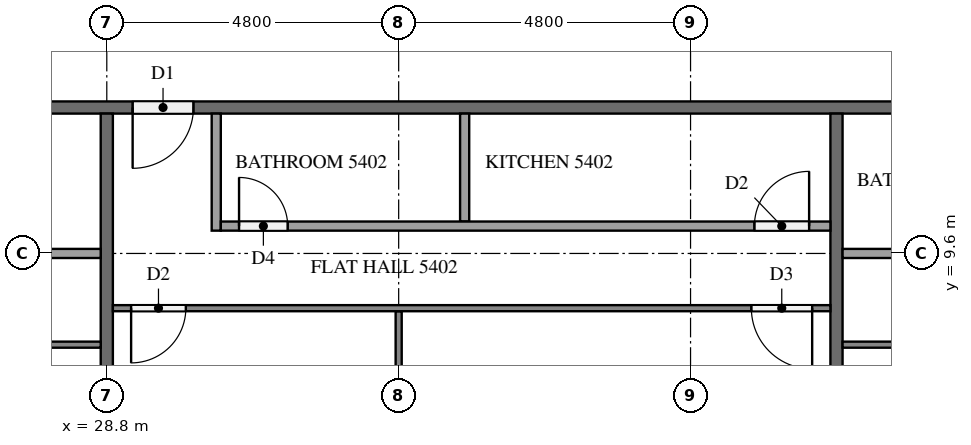
"""IFC4 building model, lengths in metres.
Left out: names, types, materials, properties, quantities, classifications, styles, units other than length and angle.
Written with IfcOpenShell. Run it as: python <this file> out.ifc"""

import sys

from ifc_helpers import new_model, si_unit, direction, frame, frame_2d, origin, place, context, subcontext, project, spatial, rectangle, extrude, element, fill, save


model = new_model("IFC4")
c1 = context("Model", 3, precision=1e-05, world=origin(), true_north=direction((0.0, 1.0)))
c2 = subcontext(c1, "Body", "Model", "MODEL_VIEW")
j1 = project(units=[si_unit("LENGTHUNIT", "METRE"), si_unit("PLANEANGLEUNIT", "RADIAN")], contexts=[c1])
p1 = place(None, origin())
s1 = spatial("IfcSite", under=j1, at=p1, CompositionType="ELEMENT")
p2 = place(p1, origin())
s2 = spatial("IfcBuilding", under=s1, at=p2, CompositionType="ELEMENT")
p3 = place(p2, frame((0.0, 0.0, 208.8)))
s3 = spatial("IfcBuildingStorey", under=s2, at=p3, CompositionType="ELEMENT", Elevation=208.8)
p4 = place(p3, frame((50.5, 12.0, 0.0), z_axis=(0.0, 0.0, 1.0), x_axis=(-1.0, 0.0, 0.0)))
e1 = element("IfcWall", 1, at=p4, inside=s3, PredefinedType="PARTITIONING", context=c2, shape_type="SweptSolid", body=[
    extrude(rectangle(XDim=38.6, YDim=0.2, at=frame_2d((19.3, 0.0))), origin(), (0.0, 0.0, 1.0), 3.2),
])
p5 = place(p4, frame((37.075, 0.0, 0.0)))
e2 = element("IfcOpeningElement", 2, at=p5, cuts=e1, PredefinedType="OPENING", context=c2, shape_type="SweptSolid", body=[
    extrude(rectangle(XDim=1.0, YDim=2.1, at=frame_2d((0.5, 1.05))), frame((0.0, 0.11, 0.0), z_axis=(0.0, -1.0, 0.0), x_axis=(1.0, 0.0, 0.0)), (0.0, 0.0, 1.0), 0.22),
])
p6 = place(p4, frame((20.275, 0.0, 0.0)))
e3 = element("IfcOpeningElement", 3, at=p6, cuts=e1, PredefinedType="OPENING", context=c2, shape_type="SweptSolid", body=[
    extrude(rectangle(XDim=1.0, YDim=2.1, at=frame_2d((0.5, 1.05))), frame((0.0, 0.11, 0.0), z_axis=(0.0, -1.0, 0.0), x_axis=(1.0, 0.0, 0.0)), (0.0, 0.0, 1.0), 0.22),
])
p7 = place(p4, frame((0.525, 0.0, 0.0)))
e4 = element("IfcOpeningElement", 4, at=p7, cuts=e1, PredefinedType="OPENING", context=c2, shape_type="SweptSolid", body=[
    extrude(rectangle(XDim=1.0, YDim=2.1, at=frame_2d((0.5, 1.05))), frame((0.0, 0.11, 0.0), z_axis=(0.0, -1.0, 0.0), x_axis=(1.0, 0.0, 0.0)), (0.0, 0.0, 1.0), 0.22),
])
p8 = place(p3, frame((28.8, 11.9, 0.0), z_axis=(0.0, 0.0, 1.0), x_axis=(0.0, -1.0, 0.0)))
e5 = element("IfcWall", 5, at=p8, inside=s3, PredefinedType="PARTITIONING", context=c2, shape_type="SweptSolid", body=[
    extrude(rectangle(XDim=6.775, YDim=0.2, at=frame_2d((3.387, 0.0))), origin(), (0.0, 0.0, 1.0), 3.2),
])
p9 = place(p3, frame((40.8, 11.9, 0.0), z_axis=(0.0, 0.0, 1.0), x_axis=(0.0, -1.0, 0.0)))
e6 = element("IfcWall", 6, at=p9, inside=s3, PredefinedType="PARTITIONING", context=c2, shape_type="SweptSolid", body=[
    extrude(rectangle(XDim=7.0, YDim=0.2, at=frame_2d((3.5, 0.0))), origin(), (0.0, 0.0, 1.0), 3.2),
])
p10 = place(p3, frame((28.7, 8.1, 0.0), z_axis=(0.0, 0.0, 1.0), x_axis=(-1.0, 0.0, 0.0)))
e7 = element("IfcWall", 7, at=p10, inside=s3, PredefinedType="PARTITIONING", context=c2, shape_type="SweptSolid", body=[
    extrude(rectangle(XDim=16.6, YDim=0.1, at=frame_2d((8.3, 0.0))), origin(), (0.0, 0.0, 1.0), 3.2),
])
p11 = place(p10, frame((15.4, 0.0, 0.0)))
e8 = element("IfcOpeningElement", 8, at=p11, cuts=e7, PredefinedType="OPENING", context=c2, shape_type="SweptSolid", body=[
    extrude(rectangle(XDim=0.9, YDim=2.1, at=frame_2d((0.45, 1.05))), frame((0.0, 0.06, 0.0), z_axis=(0.0, -1.0, 0.0), x_axis=(1.0, 0.0, 0.0)), (0.0, 0.0, 1.0), 0.12),
])
p12 = place(p10, frame((5.05, 0.0, 0.0)))
e9 = element("IfcOpeningElement", 9, at=p12, cuts=e7, PredefinedType="OPENING", context=c2, shape_type="SweptSolid", body=[
    extrude(rectangle(XDim=1.0, YDim=2.1, at=frame_2d((0.5, 1.05))), frame((0.0, 0.06, 0.0), z_axis=(0.0, -1.0, 0.0), x_axis=(1.0, 0.0, 0.0)), (0.0, 0.0, 1.0), 0.12),
])
p13 = place(p10, frame((3.45, 0.0, 0.0)))
e10 = element("IfcOpeningElement", 10, at=p13, cuts=e7, PredefinedType="OPENING", context=c2, shape_type="SweptSolid", body=[
    extrude(rectangle(XDim=0.9, YDim=2.1, at=frame_2d((0.45, 1.05))), frame((0.0, 0.06, 0.0), z_axis=(0.0, -1.0, 0.0), x_axis=(1.0, 0.0, 0.0)), (0.0, 0.0, 1.0), 0.12),
])
p14 = place(p3, frame((13.875, 9.6, 0.0), z_axis=(0.0, 0.0, 1.0), x_axis=(1.0, 0.0, 0.0)))
e11 = element("IfcWall", 11, at=p14, inside=s3, PredefinedType="PARTITIONING", context=c2, shape_type="SweptSolid", body=[
    extrude(rectangle(XDim=14.825, YDim=0.15, at=frame_2d((7.413, 0.0))), origin(), (0.0, 0.0, 1.0), 3.2),
])
p15 = place(p14, frame((0.3, 0.0, 0.0)))
e12 = element("IfcOpeningElement", 12, at=p15, cuts=e11, PredefinedType="OPENING", context=c2, shape_type="SweptSolid", body=[
    extrude(rectangle(XDim=0.9, YDim=2.1, at=frame_2d((0.45, 1.05))), frame((0.0, 0.085, 0.0), z_axis=(0.0, -1.0, 0.0), x_axis=(1.0, 0.0, 0.0)), (0.0, 0.0, 1.0), 0.17),
])
p16 = place(p14, frame((9.138, 0.0, 0.0)))
e13 = element("IfcOpeningElement", 13, at=p16, cuts=e11, PredefinedType="OPENING", context=c2, shape_type="SweptSolid", body=[
    extrude(rectangle(XDim=0.8, YDim=2.1, at=frame_2d((0.4, 1.05))), frame((0.0, 0.085, 0.0), z_axis=(0.0, -1.0, 0.0), x_axis=(1.0, 0.0, 0.0)), (0.0, 0.0, 1.0), 0.17),
])
p17 = place(p14, frame((10.588, 0.0, 0.0)))
e14 = element("IfcOpeningElement", 14, at=p17, cuts=e11, PredefinedType="OPENING", context=c2, shape_type="SweptSolid", body=[
    extrude(rectangle(XDim=0.9, YDim=2.1, at=frame_2d((0.45, 1.05))), frame((0.0, 0.085, 0.0), z_axis=(0.0, -1.0, 0.0), x_axis=(1.0, 0.0, 0.0)), (0.0, 0.0, 1.0), 0.17),
])
p18 = place(p3, frame((33.6, 8.65, 0.0), z_axis=(0.0, 0.0, 1.0), x_axis=(0.0, -1.0, 0.0)))
e15 = element("IfcWall", 15, at=p18, inside=s3, PredefinedType="PARTITIONING", context=c2, shape_type="SweptSolid", body=[
    extrude(rectangle(XDim=3.75, YDim=0.1, at=frame_2d((1.875, 0.0))), origin(), (0.0, 0.0, 1.0), 3.2),
])
p19 = place(p3, frame((40.7, 8.7, 0.0), z_axis=(0.0, 0.0, 1.0), x_axis=(-1.0, 0.0, 0.0)))
e16 = element("IfcWall", 16, at=p19, inside=s3, PredefinedType="PARTITIONING", context=c2, shape_type="SweptSolid", body=[
    extrude(rectangle(XDim=11.8, YDim=0.1, at=frame_2d((5.9, 0.0))), origin(), (0.0, 0.0, 1.0), 3.2),
])
p20 = place(p19, frame((10.6, 0.0, 0.0)))
e17 = element("IfcOpeningElement", 17, at=p20, cuts=e16, PredefinedType="OPENING", context=c2, shape_type="SweptSolid", body=[
    extrude(rectangle(XDim=0.9, YDim=2.1, at=frame_2d((0.45, 1.05))), frame((0.0, 0.06, 0.0), z_axis=(0.0, -1.0, 0.0), x_axis=(1.0, 0.0, 0.0)), (0.0, 0.0, 1.0), 0.12),
])
p21 = place(p19, frame((0.3, 0.0, 0.0)))
e18 = element("IfcOpeningElement", 18, at=p21, cuts=e16, PredefinedType="OPENING", context=c2, shape_type="SweptSolid", body=[
    extrude(rectangle(XDim=1.0, YDim=2.1, at=frame_2d((0.5, 1.05))), frame((0.0, 0.06, 0.0), z_axis=(0.0, -1.0, 0.0), x_axis=(1.0, 0.0, 0.0)), (0.0, 0.0, 1.0), 0.12),
])
p22 = place(p3, frame((34.685, 11.9, 0.0), z_axis=(0.0, 0.0, 1.0), x_axis=(0.0, -1.0, 0.0)))
e19 = element("IfcWall", 19, at=p22, inside=s3, PredefinedType="PARTITIONING", context=c2, shape_type="SweptSolid", body=[
    extrude(rectangle(XDim=1.775, YDim=0.15, at=frame_2d((0.887, 0.0))), origin(), (0.0, 0.0, 1.0), 3.2),
])
p23 = place(p3, frame((30.6, 11.9, 0.0), z_axis=(0.0, 0.0, 1.0), x_axis=(0.0, -1.0, 0.0)))
e20 = element("IfcWall", 20, at=p23, inside=s3, PredefinedType="PARTITIONING", context=c2, shape_type="SweptSolid", body=[
    extrude(rectangle(XDim=1.925, YDim=0.15, at=frame_2d((0.962, 0.0))), origin(), (0.0, 0.0, 1.0), 3.2),
])
p24 = place(p3, frame((30.675, 10.05, 0.0), z_axis=(0.0, 0.0, 1.0), x_axis=(1.0, 0.0, 0.0)))
e21 = element("IfcWall", 21, at=p24, inside=s3, PredefinedType="PARTITIONING", context=c2, shape_type="SweptSolid", body=[
    extrude(rectangle(XDim=10.025, YDim=0.15, at=frame_2d((5.012, 0.0))), origin(), (0.0, 0.0, 1.0), 3.2),
])
p25 = place(p24, frame((0.3, 0.0, 0.0)))
e22 = element("IfcOpeningElement", 22, at=p25, cuts=e21, PredefinedType="OPENING", context=c2, shape_type="SweptSolid", body=[
    extrude(rectangle(XDim=0.8, YDim=2.1, at=frame_2d((0.4, 1.05))), frame((0.0, 0.085, 0.0), z_axis=(0.0, -1.0, 0.0), x_axis=(1.0, 0.0, 0.0)), (0.0, 0.0, 1.0), 0.17),
])
p26 = place(p24, frame((8.775, 0.0, 0.0)))
e23 = element("IfcOpeningElement", 23, at=p26, cuts=e21, PredefinedType="OPENING", context=c2, shape_type="SweptSolid", body=[
    extrude(rectangle(XDim=0.9, YDim=2.1, at=frame_2d((0.45, 1.05))), frame((0.0, 0.085, 0.0), z_axis=(0.0, -1.0, 0.0), x_axis=(1.0, 0.0, 0.0)), (0.0, 0.0, 1.0), 0.17),
])
p27 = place(p3, frame((50.3, 8.1, 0.0), z_axis=(0.0, 0.0, 1.0), x_axis=(-1.0, 0.0, 0.0)))
e24 = element("IfcWall", 24, at=p27, inside=s3, PredefinedType="PARTITIONING", context=c2, shape_type="SweptSolid", body=[
    extrude(rectangle(XDim=9.4, YDim=0.1, at=frame_2d((4.7, 0.0))), origin(), (0.0, 0.0, 1.0), 3.2),
])
p28 = place(p27, frame((3.35, 0.0, 0.0)))
e25 = element("IfcOpeningElement", 25, at=p28, cuts=e24, PredefinedType="OPENING", context=c2, shape_type="SweptSolid", body=[
    extrude(rectangle(XDim=1.0, YDim=2.1, at=frame_2d((0.5, 1.05))), frame((0.0, 0.06, 0.0), z_axis=(0.0, -1.0, 0.0), x_axis=(1.0, 0.0, 0.0)), (0.0, 0.0, 1.0), 0.12),
])
p29 = place(p27, frame((5.05, 0.0, 0.0)))
e26 = element("IfcOpeningElement", 26, at=p29, cuts=e24, PredefinedType="OPENING", context=c2, shape_type="SweptSolid", body=[
    extrude(rectangle(XDim=0.9, YDim=2.1, at=frame_2d((0.45, 1.05))), frame((0.0, 0.06, 0.0), z_axis=(0.0, -1.0, 0.0), x_axis=(1.0, 0.0, 0.0)), (0.0, 0.0, 1.0), 0.12),
])
p30 = place(p3, frame((40.9, 9.6, 0.0), z_axis=(0.0, 0.0, 1.0), x_axis=(1.0, 0.0, 0.0)))
e27 = element("IfcWall", 27, at=p30, inside=s3, PredefinedType="PARTITIONING", context=c2, shape_type="SweptSolid", body=[
    extrude(rectangle(XDim=7.625, YDim=0.15, at=frame_2d((3.812, 0.0))), origin(), (0.0, 0.0, 1.0), 3.2),
])
p31 = place(p30, frame((3.375, 0.0, 0.0)))
e28 = element("IfcOpeningElement", 28, at=p31, cuts=e27, PredefinedType="OPENING", context=c2, shape_type="SweptSolid", body=[
    extrude(rectangle(XDim=0.9, YDim=2.1, at=frame_2d((0.45, 1.05))), frame((0.0, 0.085, 0.0), z_axis=(0.0, -1.0, 0.0), x_axis=(1.0, 0.0, 0.0)), (0.0, 0.0, 1.0), 0.17),
])
p32 = place(p30, frame((1.925, 0.0, 0.0)))
e29 = element("IfcOpeningElement", 29, at=p32, cuts=e27, PredefinedType="OPENING", context=c2, shape_type="SweptSolid", body=[
    extrude(rectangle(XDim=0.8, YDim=2.1, at=frame_2d((0.4, 1.05))), frame((0.0, 0.085, 0.0), z_axis=(0.0, -1.0, 0.0), x_axis=(1.0, 0.0, 0.0)), (0.0, 0.0, 1.0), 0.17),
])
p33 = place(p6, origin())
e30 = element("IfcDoor", 30, at=p33, inside=s3, OperationType="SINGLE_SWING_RIGHT", PredefinedType="DOOR", context=c2, shape_type="SweptSolid", body=[
    extrude(rectangle(XDim=1.0, YDim=2.1, at=frame_2d((0.5, 1.05))), frame((0.0, 0.025, 0.0), z_axis=(0.0, -1.0, 0.0), x_axis=(1.0, 0.0, 0.0)), (0.0, 0.0, 1.0), 0.05),
])
fill(e3, e30)
p34 = place(p20, origin())
e31 = element("IfcDoor", 31, at=p34, inside=s3, OperationType="SINGLE_SWING_RIGHT", PredefinedType="DOOR", context=c2, shape_type="SweptSolid", body=[
    extrude(rectangle(XDim=0.9, YDim=2.1, at=frame_2d((0.45, 1.05))), frame((0.0, 0.025, 0.0), z_axis=(0.0, -1.0, 0.0), x_axis=(1.0, 0.0, 0.0)), (0.0, 0.0, 1.0), 0.05),
])
fill(e17, e31)
p35 = place(p21, origin())
e32 = element("IfcDoor", 32, at=p35, inside=s3, OperationType="SINGLE_SWING_LEFT", PredefinedType="DOOR", context=c2, shape_type="SweptSolid", body=[
    extrude(rectangle(XDim=1.0, YDim=2.1, at=frame_2d((0.5, 1.05))), frame((0.0, 0.025, 0.0), z_axis=(0.0, -1.0, 0.0), x_axis=(1.0, 0.0, 0.0)), (0.0, 0.0, 1.0), 0.05),
])
fill(e18, e32)
p36 = place(p25, origin())
e33 = element("IfcDoor", 33, at=p36, inside=s3, OperationType="SINGLE_SWING_LEFT", PredefinedType="DOOR", context=c2, shape_type="SweptSolid", body=[
    extrude(rectangle(XDim=0.8, YDim=2.1, at=frame_2d((0.4, 1.05))), frame((0.0, 0.025, 0.0), z_axis=(0.0, -1.0, 0.0), x_axis=(1.0, 0.0, 0.0)), (0.0, 0.0, 1.0), 0.05),
])
fill(e22, e33)
p37 = place(p26, origin())
e34 = element("IfcDoor", 34, at=p37, inside=s3, OperationType="SINGLE_SWING_RIGHT", PredefinedType="DOOR", context=c2, shape_type="SweptSolid", body=[
    extrude(rectangle(XDim=0.9, YDim=2.1, at=frame_2d((0.45, 1.05))), frame((0.0, 0.025, 0.0), z_axis=(0.0, -1.0, 0.0), x_axis=(1.0, 0.0, 0.0)), (0.0, 0.0, 1.0), 0.05),
])
fill(e23, e34)
save(model, sys.argv[1])
